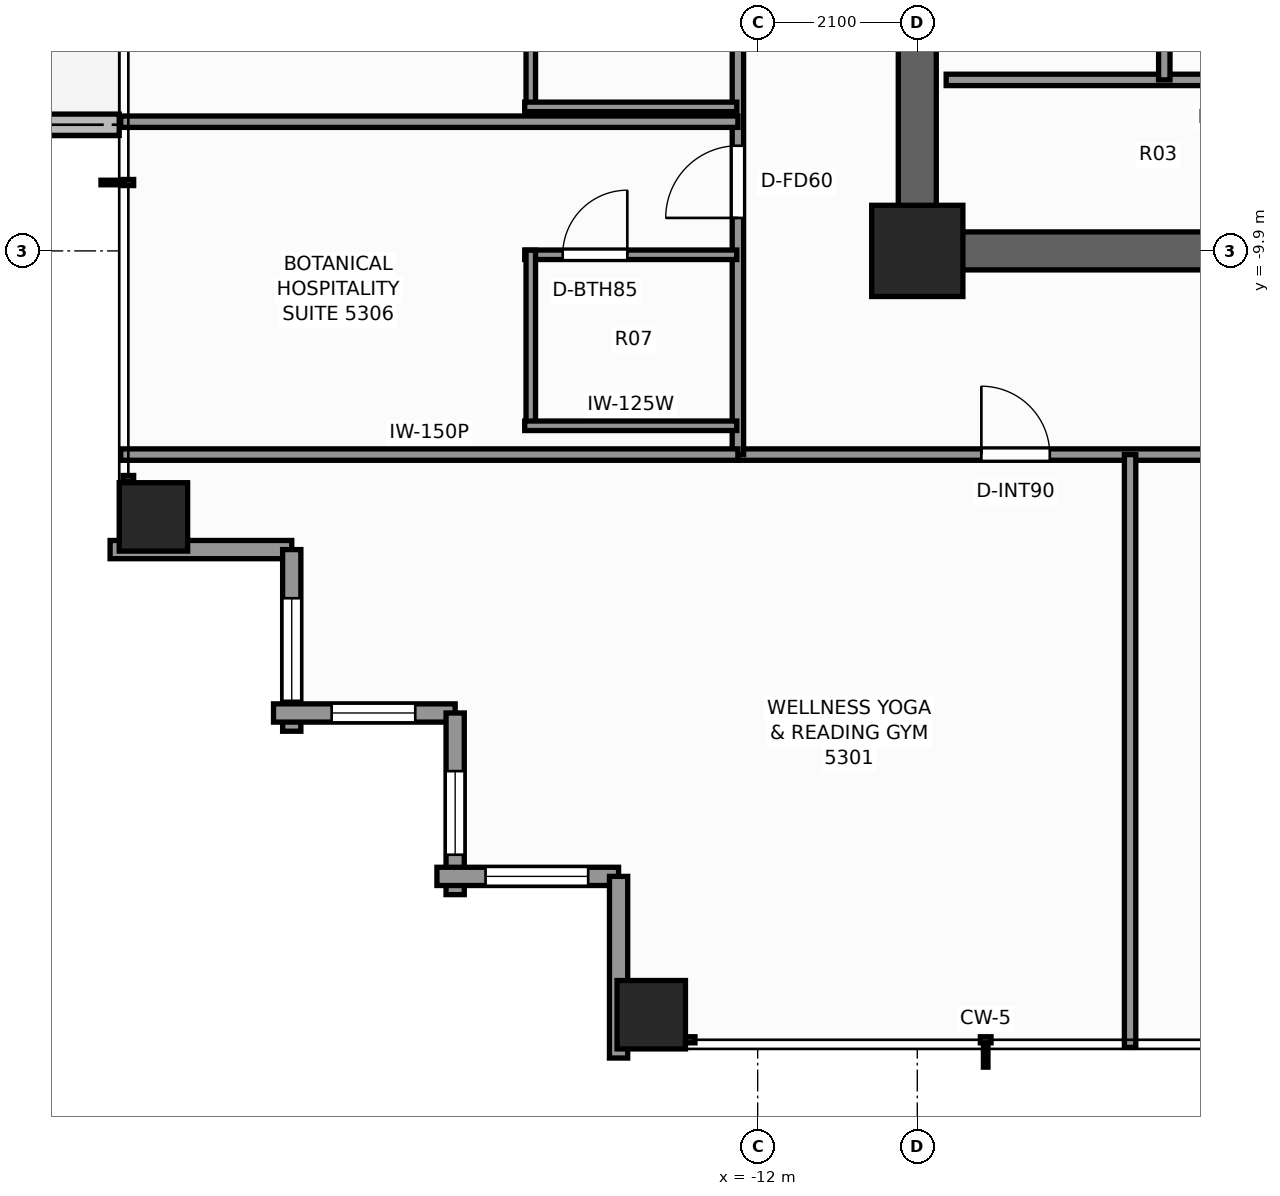
"""IFC4 building model, lengths in metres.
Left out: names, types, materials, properties, quantities, classifications, styles, units other than length and angle.
Written with IfcOpenShell. Run it as: python <this file> out.ifc"""

import sys

from ifc_helpers import new_model, si_unit, direction, frame, frame_2d, origin, origin_2d, place, context, subcontext, project, spatial, rectangle, extrude, element, fill, save


model = new_model("IFC4")
c1 = context("Model", 3, precision=1e-05, world=origin(), true_north=direction((0.0, 1.0)))
c2 = subcontext(c1, "Body", "Model", "MODEL_VIEW")
j1 = project(units=[si_unit("LENGTHUNIT", "METRE"), si_unit("PLANEANGLEUNIT", "RADIAN")], contexts=[c1])
p1 = place(None, origin())
s1 = spatial("IfcSite", under=j1, at=p1, CompositionType="ELEMENT")
p2 = place(p1, origin())
s2 = spatial("IfcBuilding", under=s1, at=p2, CompositionType="ELEMENT")
p3 = place(p2, frame((0.0, 0.0, 183.3)))
s3 = spatial("IfcBuildingStorey", under=s2, at=p3, CompositionType="ELEMENT", Elevation=183.3)
p4 = place(p3, frame((-3.54, -9.9, 0.0), z_axis=(0.0, 0.0, 1.0), x_axis=(-1.0, 0.0, 0.0)))
e1 = element("IfcWall", 1, at=p4, inside=s3, PredefinedType="SHEAR", context=c2, shape_type="SweptSolid", body=[
    extrude(rectangle(XDim=6.61, YDim=0.5, at=frame_2d((3.305, 0.0))), origin(), (0.0, 0.0, 1.0), 3.3),
])
p5 = place(p3, frame((-9.9, -9.65, 0.0), z_axis=(0.0, 0.0, 1.0), x_axis=(0.0, 1.0, 0.0)))
e2 = element("IfcWall", 2, at=p5, inside=s3, PredefinedType="SHEAR", context=c2, shape_type="SweptSolid", body=[
    extrude(rectangle(XDim=4.1, YDim=0.5, at=frame_2d((2.05, 0.0))), origin(), (0.0, 0.0, 1.0), 3.3),
])
p6 = place(p3, frame((-9.9, -9.9, 0.0), z_axis=(0.0, 0.0, 1.0), x_axis=(1.0, 0.0, 0.0)))
e3 = element("IfcColumn", 3, at=p6, inside=s3, PredefinedType="COLUMN", context=c2, shape_type="SweptSolid", body=[
    extrude(rectangle(XDim=1.2, YDim=1.2, at=origin_2d()), origin(), (0.0, 0.0, 1.0), 3.3),
])
for number, where, z_axis, x_axis in (
    (4, (-13.4, -19.95, 0.0), (0.0, 0.0, 1.0), (1.0, 0.0, 0.0)),
    (5, (-19.95, -13.4, 0.0), (0.0, 0.0, 1.0), (1.0, 0.0, 0.0)),
):
    element("IfcColumn", number, at=place(p3, frame(where, z_axis=z_axis, x_axis=x_axis)), inside=s3, PredefinedType="COLUMN", context=c2, shape_type="SweptSolid", body=[
        extrude(rectangle(XDim=0.9, YDim=0.9, at=origin_2d()), origin(), (0.0, 0.0, 1.0), 3.3),
    ])
p7 = place(p3, frame((-23.614, -8.24, -0.04), z_axis=(0.0, 0.0, 1.0), x_axis=(1.0, 0.0, 0.0)))
e6 = element("IfcWall", 6, at=p7, inside=s3, PredefinedType="PARAPET", context=c2, shape_type="SweptSolid", body=[
    extrude(rectangle(XDim=3.214, YDim=0.28, at=frame_2d((1.607, 0.0))), origin(), (0.0, 0.0, 1.0), 0.42),
])
p8 = place(p3, frame((-18.13, -13.83, 0.0), z_axis=(0.0, 0.0, 1.0), x_axis=(-1.0, 0.0, 0.0)))
e7 = element("IfcWall", 7, at=p8, inside=s3, PredefinedType="STANDARD", context=c2, shape_type="SweptSolid", body=[
    extrude(rectangle(XDim=2.39, YDim=0.24, at=frame_2d((1.195, 0.0))), origin(), (0.0, 0.0, 1.0), 2.463),
])
p9 = place(p3, frame((-18.13, -16.22, 0.0), z_axis=(0.0, 0.0, 1.0), x_axis=(0.0, 1.0, 0.0)))
e8 = element("IfcWall", 8, at=p9, inside=s3, PredefinedType="STANDARD", context=c2, shape_type="SweptSolid", body=[
    extrude(rectangle(XDim=2.39, YDim=0.24, at=frame_2d((1.195, 0.0))), origin(), (0.0, 0.0, 1.0), 2.463),
])
p10 = place(p9, frame((0.4, 0.0, 0.65)))
e9 = element("IfcOpeningElement", 9, at=p10, cuts=e8, PredefinedType="OPENING", context=c2, shape_type="SweptSolid", body=[
    extrude(rectangle(XDim=1.35, YDim=1.55, at=frame_2d((0.675, 0.775))), frame((0.0, 0.13, 0.0), z_axis=(0.0, -1.0, 0.0), x_axis=(1.0, 0.0, 0.0)), (0.0, 0.0, 1.0), 0.26),
])
p11 = place(p3, frame((-15.98, -15.98, 0.0), z_axis=(0.0, 0.0, 1.0), x_axis=(-1.0, 0.0, 0.0)))
e10 = element("IfcWall", 10, at=p11, inside=s3, PredefinedType="STANDARD", context=c2, shape_type="SweptSolid", body=[
    extrude(rectangle(XDim=2.39, YDim=0.24, at=frame_2d((1.195, 0.0))), origin(), (0.0, 0.0, 1.0), 2.463),
])
p12 = place(p11, frame((0.525, 0.0, 0.65)))
e11 = element("IfcOpeningElement", 11, at=p12, cuts=e10, PredefinedType="OPENING", context=c2, shape_type="SweptSolid", body=[
    extrude(rectangle(XDim=1.1, YDim=1.45, at=frame_2d((0.55, 0.725))), frame((0.0, 0.13, 0.0), z_axis=(0.0, -1.0, 0.0), x_axis=(1.0, 0.0, 0.0)), (0.0, 0.0, 1.0), 0.26),
])
p13 = place(p3, frame((-15.98, -18.37, 0.0), z_axis=(0.0, 0.0, 1.0), x_axis=(0.0, 1.0, 0.0)))
e12 = element("IfcWall", 12, at=p13, inside=s3, PredefinedType="STANDARD", context=c2, shape_type="SweptSolid", body=[
    extrude(rectangle(XDim=2.39, YDim=0.24, at=frame_2d((1.195, 0.0))), origin(), (0.0, 0.0, 1.0), 2.463),
])
p14 = place(p13, frame((0.525, 0.0, 0.65)))
e13 = element("IfcOpeningElement", 13, at=p14, cuts=e12, PredefinedType="OPENING", context=c2, shape_type="SweptSolid", body=[
    extrude(rectangle(XDim=1.1, YDim=1.45, at=frame_2d((0.55, 0.725))), frame((0.0, 0.13, 0.0), z_axis=(0.0, -1.0, 0.0), x_axis=(1.0, 0.0, 0.0)), (0.0, 0.0, 1.0), 0.26),
])
p15 = place(p3, frame((-13.83, -18.13, 0.0), z_axis=(0.0, 0.0, 1.0), x_axis=(-1.0, 0.0, 0.0)))
e14 = element("IfcWall", 14, at=p15, inside=s3, PredefinedType="STANDARD", context=c2, shape_type="SweptSolid", body=[
    extrude(rectangle(XDim=2.39, YDim=0.24, at=frame_2d((1.195, 0.0))), origin(), (0.0, 0.0, 1.0), 2.463),
])
p16 = place(p15, frame((0.4, 0.0, 0.65)))
e15 = element("IfcOpeningElement", 15, at=p16, cuts=e14, PredefinedType="OPENING", context=c2, shape_type="SweptSolid", body=[
    extrude(rectangle(XDim=1.35, YDim=1.55, at=frame_2d((0.675, 0.775))), frame((0.0, 0.13, 0.0), z_axis=(0.0, -1.0, 0.0), x_axis=(1.0, 0.0, 0.0)), (0.0, 0.0, 1.0), 0.26),
])
p17 = place(p3, frame((-13.83, -20.52, 0.0), z_axis=(0.0, 0.0, 1.0), x_axis=(0.0, 1.0, 0.0)))
e16 = element("IfcWall", 16, at=p17, inside=s3, PredefinedType="STANDARD", context=c2, shape_type="SweptSolid", body=[
    extrude(rectangle(XDim=2.39, YDim=0.24, at=frame_2d((1.195, 0.0))), origin(), (0.0, 0.0, 1.0), 2.463),
])
p18 = place(p3, frame((-9.52, -7.65, 0.0), z_axis=(0.0, 0.0, 1.0), x_axis=(1.0, 0.0, 0.0)))
e17 = element("IfcWall", 17, at=p18, inside=s3, PredefinedType="PARTITIONING", context=c2, shape_type="SweptSolid", body=[
    extrude(rectangle(XDim=5.66, YDim=0.15, at=frame_2d((2.83, 0.0))), origin(), (0.0, 0.0, 1.0), 3.08),
])
p19 = place(p18, frame((3.4, 0.0, 0.0)))
e18 = element("IfcOpeningElement", 18, at=p19, cuts=e17, PredefinedType="OPENING", context=c2, shape_type="SweptSolid", body=[
    extrude(rectangle(XDim=0.85, YDim=2.03, at=frame_2d((0.425, 1.015))), frame((0.0, 0.085, 0.0), z_axis=(0.0, -1.0, 0.0), x_axis=(1.0, 0.0, 0.0)), (0.0, 0.0, 1.0), 0.17),
])
p20 = place(p3, frame((-6.65, -7.65, 0.0), z_axis=(0.0, 0.0, 1.0), x_axis=(0.0, 1.0, 0.0)))
e19 = element("IfcWall", 19, at=p20, inside=s3, PredefinedType="PARTITIONING", context=c2, shape_type="SweptSolid", body=[
    extrude(rectangle(XDim=1.93, YDim=0.15, at=frame_2d((0.965, 0.0))), origin(), (0.0, 0.0, 1.0), 3.08),
])
p21 = place(p3, frame((-12.26, -12.58, 0.0), z_axis=(0.0, 0.0, 1.0), x_axis=(1.0, 0.0, 0.0)))
e20 = element("IfcWall", 20, at=p21, inside=s3, PredefinedType="PARTITIONING", context=c2, shape_type="SweptSolid", body=[
    extrude(rectangle(XDim=24.84, YDim=0.15, at=frame_2d((12.42, 0.0))), origin(), (0.0, 0.0, 1.0), 2.369),
])
p22 = place(p21, frame((3.203, 0.0, 0.0)))
e21 = element("IfcOpeningElement", 21, at=p22, cuts=e20, PredefinedType="OPENING", context=c2, shape_type="SweptSolid", body=[
    extrude(rectangle(XDim=0.9, YDim=2.06, at=frame_2d((0.45, 1.03))), frame((0.0, 0.085, 0.0), z_axis=(0.0, -1.0, 0.0), x_axis=(1.0, 0.0, 0.0)), (0.0, 0.0, 1.0), 0.17),
])
p23 = place(p21, frame((9.78, 0.0, 0.0)))
e22 = element("IfcOpeningElement", 22, at=p23, cuts=e20, PredefinedType="OPENING", context=c2, shape_type="SweptSolid", body=[
    extrude(rectangle(XDim=0.9, YDim=2.06, at=frame_2d((0.45, 1.03))), frame((0.0, 0.085, 0.0), z_axis=(0.0, -1.0, 0.0), x_axis=(1.0, 0.0, 0.0)), (0.0, 0.0, 1.0), 0.17),
])
p24 = place(p21, frame((19.345, 0.0, 0.0)))
e23 = element("IfcOpeningElement", 23, at=p24, cuts=e20, PredefinedType="OPENING", context=c2, shape_type="SweptSolid", body=[
    extrude(rectangle(XDim=0.9, YDim=2.06, at=frame_2d((0.45, 1.03))), frame((0.0, 0.085, 0.0), z_axis=(0.0, -1.0, 0.0), x_axis=(1.0, 0.0, 0.0)), (0.0, 0.0, 1.0), 0.17),
])
p25 = place(p3, frame((-12.26, -12.58, 0.0), z_axis=(0.0, 0.0, 1.0), x_axis=(0.0, 1.0, 0.0)))
e24 = element("IfcWall", 24, at=p25, inside=s3, PredefinedType="PARTITIONING", context=c2, shape_type="SweptSolid", body=[
    extrude(rectangle(XDim=24.84, YDim=0.15, at=frame_2d((12.42, 0.0))), origin(), (0.0, 0.0, 1.0), 2.369),
])
p26 = place(p25, frame((3.114, 0.0, 0.0)))
e25 = element("IfcOpeningElement", 25, at=p26, cuts=e24, PredefinedType="OPENING", context=c2, shape_type="SweptSolid", body=[
    extrude(rectangle(XDim=0.95, YDim=2.06, at=frame_2d((0.475, 1.03))), frame((0.0, 0.085, 0.0), z_axis=(0.0, -1.0, 0.0), x_axis=(1.0, 0.0, 0.0)), (0.0, 0.0, 1.0), 0.17),
])
p27 = place(p25, frame((9.119, 0.0, 0.0)))
e26 = element("IfcOpeningElement", 26, at=p27, cuts=e24, PredefinedType="OPENING", context=c2, shape_type="SweptSolid", body=[
    extrude(rectangle(XDim=0.95, YDim=2.06, at=frame_2d((0.475, 1.03))), frame((0.0, 0.085, 0.0), z_axis=(0.0, -1.0, 0.0), x_axis=(1.0, 0.0, 0.0)), (0.0, 0.0, 1.0), 0.17),
])
p28 = place(p25, frame((14.24, 0.0, 0.0)))
e27 = element("IfcOpeningElement", 27, at=p28, cuts=e24, PredefinedType="OPENING", context=c2, shape_type="SweptSolid", body=[
    extrude(rectangle(XDim=0.95, YDim=2.06, at=frame_2d((0.475, 1.03))), frame((0.0, 0.085, 0.0), z_axis=(0.0, -1.0, 0.0), x_axis=(1.0, 0.0, 0.0)), (0.0, 0.0, 1.0), 0.17),
])
p29 = place(p25, frame((19.574, 0.0, 0.0)))
e28 = element("IfcOpeningElement", 28, at=p29, cuts=e24, PredefinedType="OPENING", context=c2, shape_type="SweptSolid", body=[
    extrude(rectangle(XDim=0.95, YDim=2.06, at=frame_2d((0.475, 1.03))), frame((0.0, 0.085, 0.0), z_axis=(0.0, -1.0, 0.0), x_axis=(1.0, 0.0, 0.0)), (0.0, 0.0, 1.0), 0.17),
])
p30 = place(p25, frame((21.254, 0.0, 0.0)))
e29 = element("IfcOpeningElement", 29, at=p30, cuts=e24, PredefinedType="OPENING", context=c2, shape_type="SweptSolid", body=[
    extrude(rectangle(XDim=0.9, YDim=2.06, at=frame_2d((0.45, 1.03))), frame((0.0, 0.085, 0.0), z_axis=(0.0, -1.0, 0.0), x_axis=(1.0, 0.0, 0.0)), (0.0, 0.0, 1.0), 0.17),
])
p31 = place(p3, frame((-20.38, -12.58, 0.0), z_axis=(0.0, 0.0, 1.0), x_axis=(1.0, 0.0, 0.0)))
e30 = element("IfcWall", 30, at=p31, inside=s3, PredefinedType="PARTITIONING", context=c2, shape_type="SweptSolid", body=[
    extrude(rectangle(XDim=8.12, YDim=0.15, at=frame_2d((4.06, 0.0))), origin(), (0.0, 0.0, 1.0), 2.369),
])
p32 = place(p3, frame((-7.1, -20.38, 0.0), z_axis=(0.0, 0.0, 1.0), x_axis=(0.0, 1.0, 0.0)))
e31 = element("IfcWall", 31, at=p32, inside=s3, PredefinedType="PARTITIONING", context=c2, shape_type="SweptSolid", body=[
    extrude(rectangle(XDim=7.8, YDim=0.15, at=frame_2d((3.9, 0.0))), origin(), (0.0, 0.0, 1.0), 2.453),
])
p33 = place(p3, frame((-20.38, -8.2, 0.0), z_axis=(0.0, 0.0, 1.0), x_axis=(1.0, 0.0, 0.0)))
e32 = element("IfcWall", 32, at=p33, inside=s3, PredefinedType="PARTITIONING", context=c2, shape_type="SweptSolid", body=[
    extrude(rectangle(XDim=8.12, YDim=0.15, at=frame_2d((4.06, 0.0))), origin(), (0.0, 0.0, 1.0), 2.453),
])
p34 = place(p3, frame((-15.065, -9.951, 0.0), z_axis=(0.0, 0.0, 1.0), x_axis=(1.0, 0.0, 0.0)))
e33 = element("IfcWall", 33, at=p34, inside=s3, PredefinedType="PARTITIONING", context=c2, shape_type="SweptSolid", body=[
    extrude(rectangle(XDim=2.79, YDim=0.125, at=frame_2d((1.395, 0.0))), origin(), (0.0, 0.0, 1.0), 3.08),
])
p35 = place(p34, frame((0.5, 0.0, 0.0)))
e34 = element("IfcOpeningElement", 34, at=p35, cuts=e33, PredefinedType="OPENING", context=c2, shape_type="SweptSolid", body=[
    extrude(rectangle(XDim=0.85, YDim=2.03, at=frame_2d((0.425, 1.015))), frame((0.0, 0.073, 0.0), z_axis=(0.0, -1.0, 0.0), x_axis=(1.0, 0.0, 0.0)), (0.0, 0.0, 1.0), 0.145),
])
p36 = place(p3, frame((-14.985, -12.261, 0.0), z_axis=(0.0, 0.0, 1.0), x_axis=(0.0, 1.0, 0.0)))
e35 = element("IfcWall", 35, at=p36, inside=s3, PredefinedType="PARTITIONING", context=c2, shape_type="SweptSolid", body=[
    extrude(rectangle(XDim=2.37, YDim=0.125, at=frame_2d((1.185, 0.0))), origin(), (0.0, 0.0, 1.0), 2.369),
])
p37 = place(p3, frame((-15.065, -12.201, 0.0), z_axis=(0.0, 0.0, 1.0), x_axis=(1.0, 0.0, 0.0)))
e36 = element("IfcWall", 36, at=p37, inside=s3, PredefinedType="PARTITIONING", context=c2, shape_type="SweptSolid", body=[
    extrude(rectangle(XDim=2.79, YDim=0.125, at=frame_2d((1.395, 0.0))), origin(), (0.0, 0.0, 1.0), 3.08),
])
p38 = place(p3, frame((-14.985, -8.065, 0.0), z_axis=(0.0, 0.0, 1.0), x_axis=(0.0, 1.0, 0.0)))
e37 = element("IfcWall", 37, at=p38, inside=s3, PredefinedType="PARTITIONING", context=c2, shape_type="SweptSolid", body=[
    extrude(rectangle(XDim=2.37, YDim=0.125, at=frame_2d((1.185, 0.0))), origin(), (0.0, 0.0, 1.0), 3.08),
])
p39 = place(p3, frame((-15.065, -8.005, 0.0), z_axis=(0.0, 0.0, 1.0), x_axis=(1.0, 0.0, 0.0)))
e38 = element("IfcWall", 38, at=p39, inside=s3, PredefinedType="PARTITIONING", context=c2, shape_type="SweptSolid", body=[
    extrude(rectangle(XDim=2.79, YDim=0.125, at=frame_2d((1.395, 0.0))), origin(), (0.0, 0.0, 1.0), 3.08),
])
p40 = place(p10, origin())
e39 = element("IfcWindow", 39, at=p40, inside=s3, PartitioningType="SINGLE_PANEL", PredefinedType="WINDOW", context=c2, shape_type="SweptSolid", body=[
    extrude(rectangle(XDim=1.35, YDim=1.55, at=frame_2d((0.675, 0.775))), frame((0.0, 0.03, 0.0), z_axis=(0.0, -1.0, 0.0), x_axis=(1.0, 0.0, 0.0)), (0.0, 0.0, 1.0), 0.06),
])
fill(e9, e39)
p41 = place(p12, origin())
e40 = element("IfcWindow", 40, at=p41, inside=s3, PartitioningType="SINGLE_PANEL", PredefinedType="WINDOW", context=c2, shape_type="SweptSolid", body=[
    extrude(rectangle(XDim=1.1, YDim=1.45, at=frame_2d((0.55, 0.725))), frame((0.0, 0.03, 0.0), z_axis=(0.0, -1.0, 0.0), x_axis=(1.0, 0.0, 0.0)), (0.0, 0.0, 1.0), 0.06),
])
fill(e11, e40)
p42 = place(p14, origin())
e41 = element("IfcWindow", 41, at=p42, inside=s3, PartitioningType="SINGLE_PANEL", PredefinedType="WINDOW", context=c2, shape_type="SweptSolid", body=[
    extrude(rectangle(XDim=1.1, YDim=1.45, at=frame_2d((0.55, 0.725))), frame((0.0, 0.03, 0.0), z_axis=(0.0, -1.0, 0.0), x_axis=(1.0, 0.0, 0.0)), (0.0, 0.0, 1.0), 0.06),
])
fill(e13, e41)
p43 = place(p16, origin())
e42 = element("IfcWindow", 42, at=p43, inside=s3, PartitioningType="SINGLE_PANEL", PredefinedType="WINDOW", context=c2, shape_type="SweptSolid", body=[
    extrude(rectangle(XDim=1.35, YDim=1.55, at=frame_2d((0.675, 0.775))), frame((0.0, 0.03, 0.0), z_axis=(0.0, -1.0, 0.0), x_axis=(1.0, 0.0, 0.0)), (0.0, 0.0, 1.0), 0.06),
])
fill(e15, e42)
p44 = place(p22, origin())
e43 = element("IfcDoor", 43, at=p44, inside=s3, OperationType="SINGLE_SWING_LEFT", PredefinedType="DOOR", context=c2, shape_type="SweptSolid", body=[
    extrude(rectangle(XDim=0.9, YDim=2.06, at=frame_2d((0.45, 1.03))), frame((0.0, 0.025, 0.0), z_axis=(0.0, -1.0, 0.0), x_axis=(1.0, 0.0, 0.0)), (0.0, 0.0, 1.0), 0.05),
])
fill(e21, e43)
p45 = place(p35, origin())
e44 = element("IfcDoor", 44, at=p45, inside=s3, OperationType="SINGLE_SWING_RIGHT", PredefinedType="DOOR", context=c2, shape_type="SweptSolid", body=[
    extrude(rectangle(XDim=0.85, YDim=2.03, at=frame_2d((0.425, 1.015))), frame((0.0, 0.025, 0.0), z_axis=(0.0, -1.0, 0.0), x_axis=(1.0, 0.0, 0.0)), (0.0, 0.0, 1.0), 0.05),
])
fill(e34, e44)
p46 = place(p26, origin())
e45 = element("IfcDoor", 45, at=p46, inside=s3, OperationType="SINGLE_SWING_LEFT", PredefinedType="DOOR", context=c2, shape_type="SweptSolid", body=[
    extrude(rectangle(XDim=0.95, YDim=2.06, at=frame_2d((0.475, 1.03))), frame((0.0, 0.025, 0.0), z_axis=(0.0, -1.0, 0.0), x_axis=(1.0, 0.0, 0.0)), (0.0, 0.0, 1.0), 0.05),
])
fill(e25, e45)
save(model, sys.argv[1])
